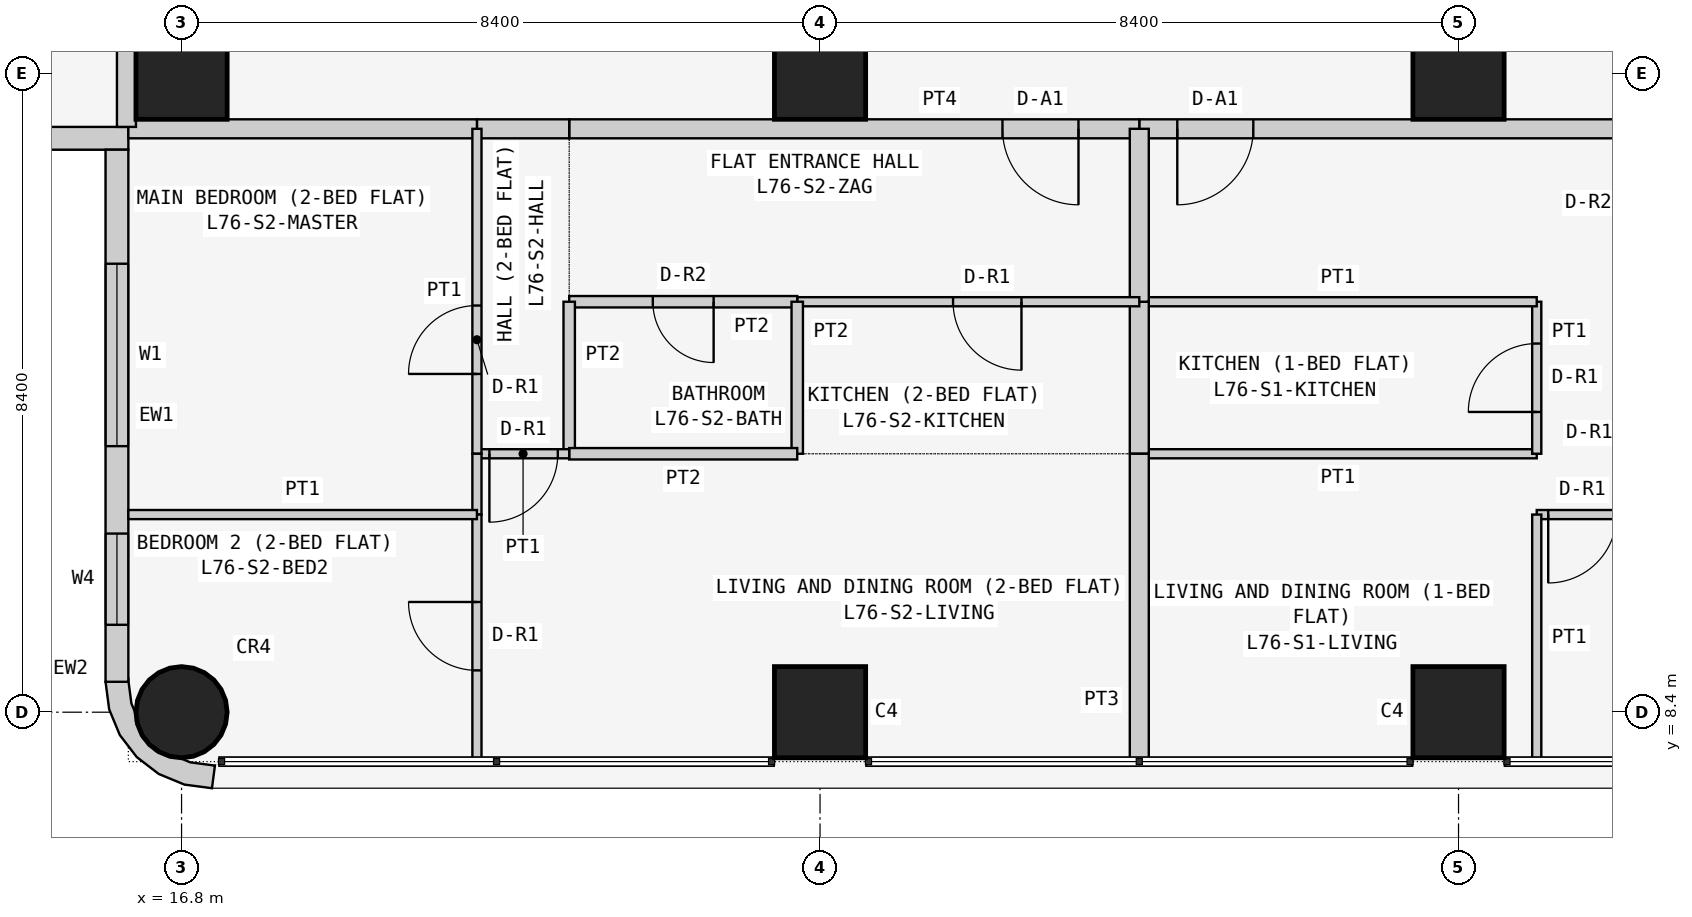
"""IFC4 building model, lengths in metres.
Left out: names, types, materials, properties, quantities, classifications, styles, units other than length and angle.
Written with IfcOpenShell. Run it as: python <this file> out.ifc"""

import sys

from ifc_helpers import new_model, si_unit, direction, frame, frame_2d, origin, origin_2d, place, context, subcontext, project, spatial, polyline, rectangle, circle, outline, extrude, element, fill, save


model = new_model("IFC4")
c1 = context("Model", 3, precision=1e-05, world=origin(), true_north=direction((0.0, 1.0)))
c2 = subcontext(c1, "Body", "Model", "MODEL_VIEW")
j1 = project(units=[si_unit("LENGTHUNIT", "METRE"), si_unit("PLANEANGLEUNIT", "RADIAN")], contexts=[c1])
p1 = place(None, origin())
s1 = spatial("IfcSite", under=j1, at=p1, CompositionType="ELEMENT")
p2 = place(p1, origin())
s2 = spatial("IfcBuilding", under=s1, at=p2, CompositionType="ELEMENT")
p3 = place(p2, frame((0.0, 0.0, 290.1)))
s3 = spatial("IfcBuildingStorey", under=s2, at=p3, CompositionType="ELEMENT", Elevation=290.1)
p4 = place(p3, frame((16.8, 8.4, 0.0), z_axis=(0.0, 0.0, 1.0), x_axis=(1.0, 0.0, 0.0)))
e1 = element("IfcColumn", 1, at=p4, inside=s3, PredefinedType="COLUMN", context=c2, shape_type="SweptSolid", body=[
    extrude(circle(Radius=0.6, at=origin_2d()), origin(), (0.0, 0.0, 1.0), 3.6),
])
for number, where, z_axis, x_axis in (
    (2, (16.8, 16.8, 0.0), (0.0, 0.0, 1.0), (1.0, 0.0, 0.0)),
    (3, (25.2, 8.4, 0.0), (0.0, 0.0, 1.0), (1.0, 0.0, 0.0)),
    (4, (25.2, 16.8, 0.0), (0.0, 0.0, 1.0), (1.0, 0.0, 0.0)),
    (5, (33.6, 8.4, 0.0), (0.0, 0.0, 1.0), (1.0, 0.0, 0.0)),
    (6, (33.6, 16.8, 0.0), (0.0, 0.0, 1.0), (1.0, 0.0, 0.0)),
):
    element("IfcColumn", number, at=place(p3, frame(where, z_axis=z_axis, x_axis=x_axis)), inside=s3, PredefinedType="COLUMN", context=c2, shape_type="SweptSolid", body=[
        extrude(rectangle(XDim=1.2, YDim=1.2, at=origin_2d()), origin(), (0.0, 0.0, 1.0), 3.6),
    ])
p5 = place(p3, frame((8.8, 15.95, 0.0), z_axis=(0.0, 0.0, 1.0), x_axis=(1.0, 0.0, 0.0)))
e7 = element("IfcWall", 7, at=p5, inside=s3, PredefinedType="SOLIDWALL", context=c2, shape_type="SweptSolid", body=[
    extrude(rectangle(XDim=7.3, YDim=0.3, at=frame_2d((3.65, 0.0))), origin(), (0.0, 0.0, 1.0), 3.45),
])
p6 = place(p5, frame((3.1, 0.0, 0.9)))
e8 = element("IfcOpeningElement", 8, at=p6, cuts=e7, PredefinedType="OPENING", context=c2, shape_type="SweptSolid", body=[
    extrude(rectangle(XDim=2.4, YDim=1.5, at=frame_2d((1.2, 0.75))), frame((0.0, 0.16, 0.0), z_axis=(0.0, -1.0, 0.0), x_axis=(1.0, 0.0, 0.0)), (0.0, 0.0, 1.0), 0.32),
])
p7 = place(p5, frame((0.75, 0.0, 0.9)))
e9 = element("IfcOpeningElement", 9, at=p7, cuts=e7, PredefinedType="OPENING", context=c2, shape_type="SweptSolid", body=[
    extrude(rectangle(XDim=1.2, YDim=1.5, at=frame_2d((0.6, 0.75))), frame((0.0, 0.16, 0.0), z_axis=(0.0, -1.0, 0.0), x_axis=(1.0, 0.0, 0.0)), (0.0, 0.0, 1.0), 0.32),
])
p8 = place(p3, frame((15.95, 15.8, 0.0), z_axis=(0.0, 0.0, 1.0), x_axis=(0.0, -1.0, 0.0)))
e10 = element("IfcWall", 10, at=p8, inside=s3, PredefinedType="SOLIDWALL", context=c2, shape_type="SweptSolid", body=[
    extrude(rectangle(XDim=7.0, YDim=0.3, at=frame_2d((3.5, 0.0))), origin(), (0.0, 0.0, 1.0), 3.45),
])
p9 = place(p8, frame((1.5, 0.0, 0.9)))
e11 = element("IfcOpeningElement", 11, at=p9, cuts=e10, PredefinedType="OPENING", context=c2, shape_type="SweptSolid", body=[
    extrude(rectangle(XDim=2.4, YDim=1.5, at=frame_2d((1.2, 0.75))), frame((0.0, 0.16, 0.0), z_axis=(0.0, -1.0, 0.0), x_axis=(1.0, 0.0, 0.0)), (0.0, 0.0, 1.0), 0.32),
])
p10 = place(p8, frame((5.05, 0.0, 0.9)))
e12 = element("IfcOpeningElement", 12, at=p10, cuts=e10, PredefinedType="OPENING", context=c2, shape_type="SweptSolid", body=[
    extrude(rectangle(XDim=1.2, YDim=1.5, at=frame_2d((0.6, 0.75))), frame((0.0, 0.16, 0.0), z_axis=(0.0, -1.0, 0.0), x_axis=(1.0, 0.0, 0.0)), (0.0, 0.0, 1.0), 0.32),
])
p11 = place(p3, frame((16.224, 8.762, 0.0), z_axis=(0.0, 0.0, 1.0), x_axis=(-0.707106781187, -0.707106781187, 0.0)))
e13 = element("IfcWall", 13, at=p11, inside=s3, PredefinedType="SOLIDWALL", context=c2, shape_type="SweptSolid", body=[
    extrude(outline(polyline([(0.033, 1.469), (0.047, 1.455), (0.233, 1.212), (0.292, 1.069), (0.358, 1.003), (0.449, 0.783), (0.449, 0.543), (0.358, 0.322), (0.292, 0.257), (0.233, 0.114), (0.047, -0.129), (0.033, -0.143), (0.273, -0.327), (0.495, -0.037), (0.635, 0.3), (0.683, 0.663), (0.635, 1.025), (0.495, 1.363), (0.273, 1.653), (0.033, 1.469)])), origin(), (0.0, 0.0, 1.0), 3.45),
])
p12 = place(p3, frame((35.829, 16.075, 0.0), z_axis=(0.0, 0.0, 1.0), x_axis=(-1.0, 0.0, 0.0)))
e14 = element("IfcWall", 14, at=p12, inside=s3, PredefinedType="PARTITIONING", context=c2, shape_type="SweptSolid", body=[
    extrude(rectangle(XDim=6.429, YDim=0.25, at=frame_2d((3.215, 0.0))), origin(), (0.0, 0.0, 1.0), 3.45),
])
p13 = place(p12, frame((4.929, 0.0, 0.0)))
e15 = element("IfcOpeningElement", 15, at=p13, cuts=e14, PredefinedType="OPENING", context=c2, shape_type="SweptSolid", body=[
    extrude(rectangle(XDim=1.0, YDim=2.1, at=frame_2d((0.5, 1.05))), frame((0.0, 0.135, 0.0), z_axis=(0.0, -1.0, 0.0), x_axis=(1.0, 0.0, 0.0)), (0.0, 0.0, 1.0), 0.27),
])
p14 = place(p3, frame((29.4, 16.075, 0.0), z_axis=(0.0, 0.0, 1.0), x_axis=(-1.0, 0.0, 0.0)))
e16 = element("IfcWall", 16, at=p14, inside=s3, PredefinedType="PARTITIONING", context=c2, shape_type="SweptSolid", body=[
    extrude(rectangle(XDim=7.5, YDim=0.25, at=frame_2d((3.75, 0.0))), origin(), (0.0, 0.0, 1.0), 3.45),
])
p15 = place(p14, frame((0.8, 0.0, 0.0)))
e17 = element("IfcOpeningElement", 17, at=p15, cuts=e16, PredefinedType="OPENING", context=c2, shape_type="SweptSolid", body=[
    extrude(rectangle(XDim=1.0, YDim=2.1, at=frame_2d((0.5, 1.05))), frame((0.0, 0.135, 0.0), z_axis=(0.0, -1.0, 0.0), x_axis=(1.0, 0.0, 0.0)), (0.0, 0.0, 1.0), 0.27),
])
p16 = place(p3, frame((21.9, 16.075, 0.0), z_axis=(0.0, 0.0, 1.0), x_axis=(-1.0, 0.0, 0.0)))
e18 = element("IfcWall", 18, at=p16, inside=s3, PredefinedType="PARTITIONING", context=c2, shape_type="SweptSolid", body=[
    extrude(rectangle(XDim=1.214, YDim=0.25, at=frame_2d((0.607, 0.0))), origin(), (0.0, 0.0, 1.0), 3.45),
])
for number, where, z_axis, x_axis in (
    (19, (20.686, 16.075, 0.0), (0.0, 0.0, 1.0), (-1.0, 0.0, 0.0)),
    (20, (16.075, 16.1, 0.0), (0.0, 0.0, 1.0), (0.0, 1.0, 0.0)),
):
    element("IfcWall", number, at=place(p3, frame(where, z_axis=z_axis, x_axis=x_axis)), inside=s3, PredefinedType="PARTITIONING", context=c2, shape_type="SweptSolid", body=[
        extrude(rectangle(XDim=4.586, YDim=0.25, at=frame_2d((2.293, 0.0))), origin(), (0.0, 0.0, 1.0), 3.45),
    ])
p17 = place(p3, frame((29.4, 11.8, 0.0), z_axis=(0.0, 0.0, 1.0), x_axis=(1.0, 0.0, 0.0)))
e21 = element("IfcWall", 21, at=p17, inside=s3, PredefinedType="PARTITIONING", context=c2, shape_type="SweptSolid", body=[
    extrude(rectangle(XDim=5.229, YDim=0.12, at=frame_2d((2.615, 0.0))), origin(), (0.0, 0.0, 1.0), 3.45),
])
p18 = place(p3, frame((34.629, 11.8, 0.0), z_axis=(0.0, 0.0, 1.0), x_axis=(0.0, 1.0, 0.0)))
e22 = element("IfcWall", 22, at=p18, inside=s3, PredefinedType="PARTITIONING", context=c2, shape_type="SweptSolid", body=[
    extrude(rectangle(XDim=2.0, YDim=0.12, at=frame_2d((1.0, 0.0))), origin(), (0.0, 0.0, 1.0), 3.45),
])
p19 = place(p18, frame((0.55, 0.0, 0.0)))
e23 = element("IfcOpeningElement", 23, at=p19, cuts=e22, PredefinedType="OPENING", context=c2, shape_type="SweptSolid", body=[
    extrude(rectangle(XDim=0.9, YDim=2.1, at=frame_2d((0.45, 1.05))), frame((0.0, 0.07, 0.0), z_axis=(0.0, -1.0, 0.0), x_axis=(1.0, 0.0, 0.0)), (0.0, 0.0, 1.0), 0.14),
])
p20 = place(p3, frame((34.629, 13.8, 0.0), z_axis=(0.0, 0.0, 1.0), x_axis=(-1.0, 0.0, 0.0)))
e24 = element("IfcWall", 24, at=p20, inside=s3, PredefinedType="PARTITIONING", context=c2, shape_type="SweptSolid", body=[
    extrude(rectangle(XDim=5.229, YDim=0.12, at=frame_2d((2.615, 0.0))), origin(), (0.0, 0.0, 1.0), 3.45),
])
p21 = place(p3, frame((29.4, 13.8, 0.0), z_axis=(0.0, 0.0, 1.0), x_axis=(0.0, -1.0, 0.0)))
e25 = element("IfcWall", 25, at=p21, inside=s3, PredefinedType="PARTITIONING", context=c2, shape_type="SweptSolid", body=[
    extrude(rectangle(XDim=2.0, YDim=0.25, at=frame_2d((1.0, 0.0))), origin(), (0.0, 0.0, 1.0), 2.848),
])
p22 = place(p3, frame((35.829, 11.0, 0.0), z_axis=(0.0, 0.0, 1.0), x_axis=(-1.0, 0.0, 0.0)))
e26 = element("IfcWall", 26, at=p22, inside=s3, PredefinedType="PARTITIONING", context=c2, shape_type="SweptSolid", body=[
    extrude(rectangle(XDim=1.2, YDim=0.12, at=frame_2d((0.6, 0.0))), origin(), (0.0, 0.0, 1.0), 3.45),
])
p23 = place(p22, frame((0.149, 0.0, 0.0)))
e27 = element("IfcOpeningElement", 27, at=p23, cuts=e26, PredefinedType="OPENING", context=c2, shape_type="SweptSolid", body=[
    extrude(rectangle(XDim=0.9, YDim=2.1, at=frame_2d((0.45, 1.05))), frame((0.0, 0.07, 0.0), z_axis=(0.0, -1.0, 0.0), x_axis=(1.0, 0.0, 0.0)), (0.0, 0.0, 1.0), 0.14),
])
p24 = place(p3, frame((34.629, 11.0, 0.0), z_axis=(0.0, 0.0, 1.0), x_axis=(0.0, -1.0, 0.0)))
e28 = element("IfcWall", 28, at=p24, inside=s3, PredefinedType="PARTITIONING", context=c2, shape_type="SweptSolid", body=[
    extrude(rectangle(XDim=3.25, YDim=0.12, at=frame_2d((1.625, 0.0))), origin(), (0.0, 0.0, 1.0), 3.45),
])
p25 = place(p3, frame((29.4, 13.8, 0.0), z_axis=(0.0, 0.0, 1.0), x_axis=(0.0, 1.0, 0.0)))
e29 = element("IfcWall", 29, at=p25, inside=s3, PredefinedType="PARTITIONING", context=c2, shape_type="SweptSolid", body=[
    extrude(rectangle(XDim=2.275, YDim=0.25, at=frame_2d((1.137, 0.0))), origin(), (0.0, 0.0, 1.0), 2.848),
])
p26 = place(p3, frame((29.4, 7.75, 0.0), z_axis=(0.0, 0.0, 1.0), x_axis=(0.0, 1.0, 0.0)))
e30 = element("IfcWall", 30, at=p26, inside=s3, PredefinedType="PARTITIONING", context=c2, shape_type="SweptSolid", body=[
    extrude(rectangle(XDim=4.05, YDim=0.25, at=frame_2d((2.025, 0.0))), origin(), (0.0, 0.0, 1.0), 2.848),
])
p27 = place(p3, frame((29.4, 13.8, 0.0), z_axis=(0.0, 0.0, 1.0), x_axis=(-1.0, 0.0, 0.0)))
e31 = element("IfcWall", 31, at=p27, inside=s3, PredefinedType="PARTITIONING", context=c2, shape_type="SweptSolid", body=[
    extrude(rectangle(XDim=4.5, YDim=0.12, at=frame_2d((2.25, 0.0))), origin(), (0.0, 0.0, 1.0), 3.45),
])
p28 = place(p27, frame((1.55, 0.0, 0.0)))
e32 = element("IfcOpeningElement", 32, at=p28, cuts=e31, PredefinedType="OPENING", context=c2, shape_type="SweptSolid", body=[
    extrude(rectangle(XDim=0.9, YDim=2.1, at=frame_2d((0.45, 1.05))), frame((0.0, 0.07, 0.0), z_axis=(0.0, -1.0, 0.0), x_axis=(1.0, 0.0, 0.0)), (0.0, 0.0, 1.0), 0.14),
])
p29 = place(p3, frame((24.9, 13.8, 0.0), z_axis=(0.0, 0.0, 1.0), x_axis=(-1.0, 0.0, 0.0)))
e33 = element("IfcWall", 33, at=p29, inside=s3, PredefinedType="PARTITIONING", context=c2, shape_type="SweptSolid", body=[
    extrude(rectangle(XDim=3.0, YDim=0.15, at=frame_2d((1.5, 0.0))), origin(), (0.0, 0.0, 1.0), 3.45),
])
p30 = place(p29, frame((1.1, 0.0, 0.0)))
e34 = element("IfcOpeningElement", 34, at=p30, cuts=e33, PredefinedType="OPENING", context=c2, shape_type="SweptSolid", body=[
    extrude(rectangle(XDim=0.8, YDim=2.1, at=frame_2d((0.4, 1.05))), frame((0.0, 0.085, 0.0), z_axis=(0.0, -1.0, 0.0), x_axis=(1.0, 0.0, 0.0)), (0.0, 0.0, 1.0), 0.17),
])
for number, where, z_axis, x_axis in (
    (35, (24.9, 11.8, 0.0), (0.0, 0.0, 1.0), (0.0, 1.0, 0.0)),
    (36, (21.9, 11.8, 0.0), (0.0, 0.0, 1.0), (0.0, 1.0, 0.0)),
):
    element("IfcWall", number, at=place(p3, frame(where, z_axis=z_axis, x_axis=x_axis)), inside=s3, PredefinedType="PARTITIONING", context=c2, shape_type="SweptSolid", body=[
        extrude(rectangle(XDim=2.0, YDim=0.15, at=frame_2d((1.0, 0.0))), origin(), (0.0, 0.0, 1.0), 3.45),
    ])
p31 = place(p3, frame((24.9, 11.8, 0.0), z_axis=(0.0, 0.0, 1.0), x_axis=(-1.0, 0.0, 0.0)))
e37 = element("IfcWall", 37, at=p31, inside=s3, PredefinedType="PARTITIONING", context=c2, shape_type="SweptSolid", body=[
    extrude(rectangle(XDim=3.0, YDim=0.15, at=frame_2d((1.5, 0.0))), origin(), (0.0, 0.0, 1.0), 3.45),
])
p32 = place(p3, frame((21.9, 11.8, 0.0), z_axis=(0.0, 0.0, 1.0), x_axis=(-1.0, 0.0, 0.0)))
e38 = element("IfcWall", 38, at=p32, inside=s3, PredefinedType="PARTITIONING", context=c2, shape_type="SweptSolid", body=[
    extrude(rectangle(XDim=1.214, YDim=0.12, at=frame_2d((0.607, 0.0))), origin(), (0.0, 0.0, 1.0), 3.45),
])
p33 = place(p32, frame((0.15, 0.0, 0.0)))
e39 = element("IfcOpeningElement", 39, at=p33, cuts=e38, PredefinedType="OPENING", context=c2, shape_type="SweptSolid", body=[
    extrude(rectangle(XDim=0.9, YDim=2.1, at=frame_2d((0.45, 1.05))), frame((0.0, 0.07, 0.0), z_axis=(0.0, -1.0, 0.0), x_axis=(1.0, 0.0, 0.0)), (0.0, 0.0, 1.0), 0.14),
])
p34 = place(p3, frame((20.686, 11.8, 0.0), z_axis=(0.0, 0.0, 1.0), x_axis=(0.0, 1.0, 0.0)))
e40 = element("IfcWall", 40, at=p34, inside=s3, PredefinedType="PARTITIONING", context=c2, shape_type="SweptSolid", body=[
    extrude(rectangle(XDim=4.275, YDim=0.12, at=frame_2d((2.137, 0.0))), origin(), (0.0, 0.0, 1.0), 3.45),
])
p35 = place(p34, frame((1.05, 0.0, 0.0)))
e41 = element("IfcOpeningElement", 41, at=p35, cuts=e40, PredefinedType="OPENING", context=c2, shape_type="SweptSolid", body=[
    extrude(rectangle(XDim=0.9, YDim=2.1, at=frame_2d((0.45, 1.05))), frame((0.0, 0.07, 0.0), z_axis=(0.0, -1.0, 0.0), x_axis=(1.0, 0.0, 0.0)), (0.0, 0.0, 1.0), 0.14),
])
p36 = place(p3, frame((20.686, 11.0, 0.0), z_axis=(0.0, 0.0, 1.0), x_axis=(0.0, 1.0, 0.0)))
e42 = element("IfcWall", 42, at=p36, inside=s3, PredefinedType="PARTITIONING", context=c2, shape_type="SweptSolid", body=[
    extrude(rectangle(XDim=0.8, YDim=0.12, at=frame_2d((0.4, 0.0))), origin(), (0.0, 0.0, 1.0), 3.45),
])
p37 = place(p3, frame((20.686, 7.75, 0.0), z_axis=(0.0, 0.0, 1.0), x_axis=(0.0, 1.0, 0.0)))
e43 = element("IfcWall", 43, at=p37, inside=s3, PredefinedType="PARTITIONING", context=c2, shape_type="SweptSolid", body=[
    extrude(rectangle(XDim=3.25, YDim=0.12, at=frame_2d((1.625, 0.0))), origin(), (0.0, 0.0, 1.0), 3.45),
])
p38 = place(p37, frame((1.2, 0.0, 0.0)))
e44 = element("IfcOpeningElement", 44, at=p38, cuts=e43, PredefinedType="OPENING", context=c2, shape_type="SweptSolid", body=[
    extrude(rectangle(XDim=0.9, YDim=2.1, at=frame_2d((0.45, 1.05))), frame((0.0, 0.07, 0.0), z_axis=(0.0, -1.0, 0.0), x_axis=(1.0, 0.0, 0.0)), (0.0, 0.0, 1.0), 0.14),
])
p39 = place(p3, frame((20.686, 11.0, 0.0), z_axis=(0.0, 0.0, 1.0), x_axis=(-1.0, 0.0, 0.0)))
e45 = element("IfcWall", 45, at=p39, inside=s3, PredefinedType="PARTITIONING", context=c2, shape_type="SweptSolid", body=[
    extrude(rectangle(XDim=4.586, YDim=0.12, at=frame_2d((2.293, 0.0))), origin(), (0.0, 0.0, 1.0), 3.45),
])
p40 = place(p9, origin())
e46 = element("IfcWindow", 46, at=p40, inside=s3, PartitioningType="SINGLE_PANEL", PredefinedType="WINDOW", context=c2, shape_type="SweptSolid", body=[
    extrude(rectangle(XDim=2.4, YDim=1.5, at=frame_2d((1.2, 0.75))), frame((0.0, 0.03, 0.0), z_axis=(0.0, -1.0, 0.0), x_axis=(1.0, 0.0, 0.0)), (0.0, 0.0, 1.0), 0.06),
])
fill(e11, e46)
p41 = place(p10, origin())
e47 = element("IfcWindow", 47, at=p41, inside=s3, PartitioningType="SINGLE_PANEL", PredefinedType="WINDOW", context=c2, shape_type="SweptSolid", body=[
    extrude(rectangle(XDim=1.2, YDim=1.5, at=frame_2d((0.6, 0.75))), frame((0.0, 0.03, 0.0), z_axis=(0.0, -1.0, 0.0), x_axis=(1.0, 0.0, 0.0)), (0.0, 0.0, 1.0), 0.06),
])
fill(e12, e47)
p42 = place(p13, origin())
e48 = element("IfcDoor", 48, at=p42, inside=s3, OperationType="SINGLE_SWING_RIGHT", PredefinedType="DOOR", context=c2, shape_type="SweptSolid", body=[
    extrude(rectangle(XDim=1.0, YDim=2.1, at=frame_2d((0.5, 1.05))), frame((0.0, 0.025, 0.0), z_axis=(0.0, -1.0, 0.0), x_axis=(1.0, 0.0, 0.0)), (0.0, 0.0, 1.0), 0.05),
])
fill(e15, e48)
p43 = place(p19, origin())
e49 = element("IfcDoor", 49, at=p43, inside=s3, OperationType="SINGLE_SWING_LEFT", PredefinedType="DOOR", context=c2, shape_type="SweptSolid", body=[
    extrude(rectangle(XDim=0.9, YDim=2.1, at=frame_2d((0.45, 1.05))), frame((0.0, 0.025, 0.0), z_axis=(0.0, -1.0, 0.0), x_axis=(1.0, 0.0, 0.0)), (0.0, 0.0, 1.0), 0.05),
])
fill(e23, e49)
p44 = place(p23, origin())
e50 = element("IfcDoor", 50, at=p44, inside=s3, OperationType="SINGLE_SWING_RIGHT", PredefinedType="DOOR", context=c2, shape_type="SweptSolid", body=[
    extrude(rectangle(XDim=0.9, YDim=2.1, at=frame_2d((0.45, 1.05))), frame((0.0, 0.025, 0.0), z_axis=(0.0, -1.0, 0.0), x_axis=(1.0, 0.0, 0.0)), (0.0, 0.0, 1.0), 0.05),
])
fill(e27, e50)
p45 = place(p15, origin())
e51 = element("IfcDoor", 51, at=p45, inside=s3, OperationType="SINGLE_SWING_LEFT", PredefinedType="DOOR", context=c2, shape_type="SweptSolid", body=[
    extrude(rectangle(XDim=1.0, YDim=2.1, at=frame_2d((0.5, 1.05))), frame((0.0, 0.025, 0.0), z_axis=(0.0, -1.0, 0.0), x_axis=(1.0, 0.0, 0.0)), (0.0, 0.0, 1.0), 0.05),
])
fill(e17, e51)
p46 = place(p28, origin())
e52 = element("IfcDoor", 52, at=p46, inside=s3, OperationType="SINGLE_SWING_LEFT", PredefinedType="DOOR", context=c2, shape_type="SweptSolid", body=[
    extrude(rectangle(XDim=0.9, YDim=2.1, at=frame_2d((0.45, 1.05))), frame((0.0, 0.025, 0.0), z_axis=(0.0, -1.0, 0.0), x_axis=(1.0, 0.0, 0.0)), (0.0, 0.0, 1.0), 0.05),
])
fill(e32, e52)
p47 = place(p30, origin())
e53 = element("IfcDoor", 53, at=p47, inside=s3, OperationType="SINGLE_SWING_LEFT", PredefinedType="DOOR", context=c2, shape_type="SweptSolid", body=[
    extrude(rectangle(XDim=0.8, YDim=2.1, at=frame_2d((0.4, 1.05))), frame((0.0, 0.025, 0.0), z_axis=(0.0, -1.0, 0.0), x_axis=(1.0, 0.0, 0.0)), (0.0, 0.0, 1.0), 0.05),
])
fill(e34, e53)
p48 = place(p33, origin())
e54 = element("IfcDoor", 54, at=p48, inside=s3, OperationType="SINGLE_SWING_RIGHT", PredefinedType="DOOR", context=c2, shape_type="SweptSolid", body=[
    extrude(rectangle(XDim=0.9, YDim=2.1, at=frame_2d((0.45, 1.05))), frame((0.0, 0.025, 0.0), z_axis=(0.0, -1.0, 0.0), x_axis=(1.0, 0.0, 0.0)), (0.0, 0.0, 1.0), 0.05),
])
fill(e39, e54)
p49 = place(p35, origin())
e55 = element("IfcDoor", 55, at=p49, inside=s3, OperationType="SINGLE_SWING_LEFT", PredefinedType="DOOR", context=c2, shape_type="SweptSolid", body=[
    extrude(rectangle(XDim=0.9, YDim=2.1, at=frame_2d((0.45, 1.05))), frame((0.0, 0.025, 0.0), z_axis=(0.0, -1.0, 0.0), x_axis=(1.0, 0.0, 0.0)), (0.0, 0.0, 1.0), 0.05),
])
fill(e41, e55)
p50 = place(p38, origin())
e56 = element("IfcDoor", 56, at=p50, inside=s3, OperationType="SINGLE_SWING_RIGHT", PredefinedType="DOOR", context=c2, shape_type="SweptSolid", body=[
    extrude(rectangle(XDim=0.9, YDim=2.1, at=frame_2d((0.45, 1.05))), frame((0.0, 0.025, 0.0), z_axis=(0.0, -1.0, 0.0), x_axis=(1.0, 0.0, 0.0)), (0.0, 0.0, 1.0), 0.05),
])
fill(e44, e56)
save(model, sys.argv[1])
